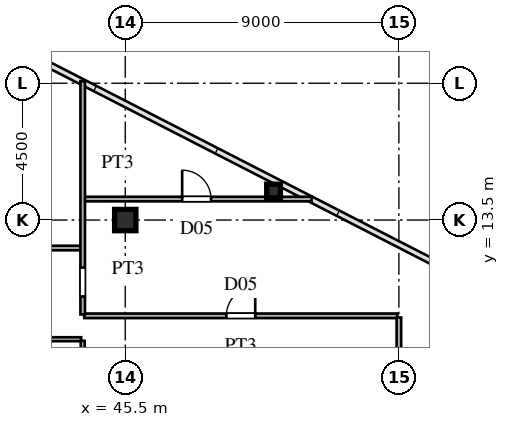
"""IFC4 building model, lengths in metres.
Left out: names, types, materials, properties, quantities, classifications, styles, units other than length and angle.
Written with IfcOpenShell. Run it as: python <this file> out.ifc"""

import sys

from ifc_helpers import new_model, si_unit, direction, frame, frame_2d, origin, origin_2d, place, context, subcontext, project, spatial, rectangle, hollow_rectangle, i_section, extrude, source, transform, mapped, element, fill, save


model = new_model("IFC4")
c1 = context("Model", 3, precision=1e-05, world=origin(), true_north=direction((0.0, 1.0)))
c2 = subcontext(c1, "Body", "Model", "MODEL_VIEW")
j1 = project(units=[si_unit("LENGTHUNIT", "METRE"), si_unit("PLANEANGLEUNIT", "RADIAN")], contexts=[c1])
p1 = place(None, origin())
s1 = spatial("IfcSite", under=j1, at=p1, CompositionType="ELEMENT")
p2 = place(p1, origin())
s2 = spatial("IfcBuilding", under=s1, at=p2, CompositionType="ELEMENT")
p3 = place(p2, frame((0.0, 0.0, 114.0)))
s3 = spatial("IfcBuildingStorey", under=s2, at=p3, CompositionType="ELEMENT", Elevation=114.0)
m1 = source(origin(), c2, "Body", "SweptSolid", [
    extrude(i_section(OverallWidth=0.7, OverallDepth=0.7, WebThickness=0.028, FlangeThickness=0.045, at=origin_2d()), origin(), (0.0, 0.0, 1.0), 3.6),
])
p4 = place(p3, frame((45.5, 13.5, 0.0), z_axis=(0.0, 0.0, 1.0), x_axis=(1.0, 0.0, 0.0)))
e1 = element("IfcColumn", 1, at=p4, inside=s3, PredefinedType="COLUMN", context=c2, shape_type="MappedRepresentation", body=[
    mapped(m1, transform((0.0, 0.0, 0.0), scale=1.0)),
])
m2 = source(origin(), c2, "Body", "SweptSolid", [
    extrude(hollow_rectangle(XDim=0.45, YDim=0.45, WallThickness=0.018, at=origin_2d()), origin(), (0.0, 0.0, 1.0), 3.6),
])
p5 = place(p3, frame((50.377, 14.453, 0.0), z_axis=(0.0, 0.0, 1.0), x_axis=(1.0, 0.0, 0.0)))
e2 = element("IfcColumn", 2, at=p5, inside=s3, PredefinedType="COLUMN", context=c2, shape_type="MappedRepresentation", body=[
    mapped(m2, transform((0.0, 0.0, 0.0), scale=1.0)),
])
p6 = place(p3, frame((38.35, 9.58, 0.0), z_axis=(0.0, 0.0, 1.0), x_axis=(1.0, 0.0, 0.0)))
e3 = element("IfcWall", 3, at=p6, inside=s3, PredefinedType="PARTITIONING", context=c2, shape_type="SweptSolid", body=[
    extrude(rectangle(XDim=5.7, YDim=0.13, at=frame_2d((2.85, 0.0))), origin(), (0.0, 0.0, 1.0), 3.38),
])
p7 = place(p6, frame((2.41, 0.0, 0.0)))
e4 = element("IfcOpeningElement", 4, at=p7, cuts=e3, PredefinedType="OPENING", context=c2, shape_type="SweptSolid", body=[
    extrude(rectangle(XDim=0.88, YDim=2.1, at=frame_2d((0.44, 1.05))), frame((0.0, 0.075, 0.0), z_axis=(0.0, -1.0, 0.0), x_axis=(1.0, 0.0, 0.0)), (0.0, 0.0, 1.0), 0.15),
])
p8 = place(p3, frame((44.15, 10.35, 0.0), z_axis=(0.0, 0.0, 1.0), x_axis=(1.0, 0.0, 0.0)))
e5 = element("IfcWall", 5, at=p8, inside=s3, PredefinedType="PARTITIONING", context=c2, shape_type="SweptSolid", body=[
    extrude(rectangle(XDim=10.3, YDim=0.15, at=frame_2d((5.15, 0.0))), origin(), (0.0, 0.0, 1.0), 3.38),
])
p9 = place(p8, frame((4.675, 0.0, 0.0)))
e6 = element("IfcOpeningElement", 6, at=p9, cuts=e5, PredefinedType="OPENING", context=c2, shape_type="SweptSolid", body=[
    extrude(rectangle(XDim=0.95, YDim=2.15, at=frame_2d((0.475, 1.075))), frame((0.0, 0.085, 0.0), z_axis=(0.0, -1.0, 0.0), x_axis=(1.0, 0.0, 0.0)), (0.0, 0.0, 1.0), 0.17),
])
p10 = place(p3, frame((38.35, 12.58, 0.0), z_axis=(0.0, 0.0, 1.0), x_axis=(1.0, 0.0, 0.0)))
e7 = element("IfcWall", 7, at=p10, inside=s3, PredefinedType="PARTITIONING", context=c2, shape_type="SweptSolid", body=[
    extrude(rectangle(XDim=5.7, YDim=0.15, at=frame_2d((2.85, 0.0))), origin(), (0.0, 0.0, 1.0), 3.38),
])
p11 = place(p10, frame((2.375, 0.0, 0.0)))
e8 = element("IfcOpeningElement", 8, at=p11, cuts=e7, PredefinedType="OPENING", context=c2, shape_type="SweptSolid", body=[
    extrude(rectangle(XDim=0.95, YDim=2.15, at=frame_2d((0.475, 1.075))), frame((0.0, 0.085, 0.0), z_axis=(0.0, -1.0, 0.0), x_axis=(1.0, 0.0, 0.0)), (0.0, 0.0, 1.0), 0.17),
])
p12 = place(p3, frame((44.15, 14.19, 0.0), z_axis=(0.0, 0.0, 1.0), x_axis=(1.0, 0.0, 0.0)))
e9 = element("IfcWall", 9, at=p12, inside=s3, PredefinedType="PARTITIONING", context=c2, shape_type="SweptSolid", body=[
    extrude(rectangle(XDim=7.477, YDim=0.15, at=frame_2d((3.739, 0.0))), origin(), (0.0, 0.0, 1.0), 2.78),
])
p13 = place(p12, frame((3.221, 0.0, 0.0)))
e10 = element("IfcOpeningElement", 10, at=p13, cuts=e9, PredefinedType="OPENING", context=c2, shape_type="SweptSolid", body=[
    extrude(rectangle(XDim=0.95, YDim=2.15, at=frame_2d((0.475, 1.075))), frame((0.0, 0.085, 0.0), z_axis=(0.0, -1.0, 0.0), x_axis=(1.0, 0.0, 0.0)), (0.0, 0.0, 1.0), 0.17),
])
p14 = place(p3, frame((44.1, 2.352, 0.0), z_axis=(0.0, 0.0, 1.0), x_axis=(0.0, 1.0, 0.0)))
e11 = element("IfcWall", 11, at=p14, inside=s3, PredefinedType="PARTITIONING", context=c2, shape_type="SweptSolid", body=[
    extrude(rectangle(XDim=7.176, YDim=0.13, at=frame_2d((3.588, 0.0))), origin(), (0.0, 0.0, 1.0), 3.38),
])
p15 = place(p3, frame((44.1, 10.395, 0.0), z_axis=(0.0, 0.0, 1.0), x_axis=(0.0, 1.0, 0.0)))
e12 = element("IfcWall", 12, at=p15, inside=s3, PredefinedType="PARTITIONING", context=c2, shape_type="SweptSolid", body=[
    extrude(rectangle(XDim=7.674, YDim=0.15, at=frame_2d((3.837, 0.0))), origin(), (0.0, 0.0, 1.0), 3.38),
])
p16 = place(p15, frame((0.591, 0.0, 0.0)))
e13 = element("IfcOpeningElement", 13, at=p16, cuts=e12, PredefinedType="OPENING", context=c2, shape_type="SweptSolid", body=[
    extrude(rectangle(XDim=0.95, YDim=2.15, at=frame_2d((0.475, 1.075))), frame((0.0, 0.085, 0.0), z_axis=(0.0, -1.0, 0.0), x_axis=(1.0, 0.0, 0.0)), (0.0, 0.0, 1.0), 0.17),
])
p17 = place(p3, frame((54.5, -10.961, 0.0), z_axis=(0.0, 0.0, 1.0), x_axis=(0.0, 1.0, 0.0)))
e14 = element("IfcWall", 14, at=p17, inside=s3, PredefinedType="PARTITIONING", context=c2, shape_type="SweptSolid", body=[
    extrude(rectangle(XDim=21.256, YDim=0.15, at=frame_2d((10.628, 0.0))), origin(), (0.0, 0.0, 1.0), 2.78),
])
p18 = place(p17, frame((1.23, 0.0, 0.0)))
e15 = element("IfcOpeningElement", 15, at=p18, cuts=e14, PredefinedType="OPENING", context=c2, shape_type="SweptSolid", body=[
    extrude(rectangle(XDim=0.95, YDim=2.15, at=frame_2d((0.475, 1.075))), frame((0.0, 0.085, 0.0), z_axis=(0.0, -1.0, 0.0), x_axis=(1.0, 0.0, 0.0)), (0.0, 0.0, 1.0), 0.17),
])
p19 = place(p17, frame((9.986, 0.0, 0.0)))
e16 = element("IfcOpeningElement", 16, at=p19, cuts=e14, PredefinedType="OPENING", context=c2, shape_type="SweptSolid", body=[
    extrude(rectangle(XDim=0.95, YDim=2.15, at=frame_2d((0.475, 1.075))), frame((0.0, 0.085, 0.0), z_axis=(0.0, -1.0, 0.0), x_axis=(1.0, 0.0, 0.0)), (0.0, 0.0, 1.0), 0.17),
])
p20 = place(p17, frame((18.908, 0.0, 0.0)))
e17 = element("IfcOpeningElement", 17, at=p20, cuts=e14, PredefinedType="OPENING", context=c2, shape_type="SweptSolid", body=[
    extrude(rectangle(XDim=0.95, YDim=2.15, at=frame_2d((0.475, 1.075))), frame((0.0, 0.085, 0.0), z_axis=(0.0, -1.0, 0.0), x_axis=(1.0, 0.0, 0.0)), (0.0, 0.0, 1.0), 0.17),
])
m3 = source(origin(), c2, "Body", "SweptSolid", [
    extrude(rectangle(XDim=0.95, YDim=2.15, at=frame_2d((0.475, 1.075))), frame((0.0, 0.025, 0.0), z_axis=(0.0, -1.0, 0.0), x_axis=(1.0, 0.0, 0.0)), (0.0, 0.0, 1.0), 0.05),
])
p21 = place(p9, origin())
e18 = element("IfcDoor", 18, at=p21, inside=s3, OperationType="SINGLE_SWING_RIGHT", PredefinedType="DOOR", context=c2, shape_type="MappedRepresentation", body=[
    mapped(m3, transform((0.0, 0.0, 0.0), scale=1.0)),
])
fill(e6, e18)
p22 = place(p13, origin())
e19 = element("IfcDoor", 19, at=p22, inside=s3, OperationType="SINGLE_SWING_LEFT", PredefinedType="DOOR", context=c2, shape_type="MappedRepresentation", body=[
    mapped(m3, transform((0.0, 0.0, 0.0), scale=1.0)),
])
fill(e10, e19)
save(model, sys.argv[1])
